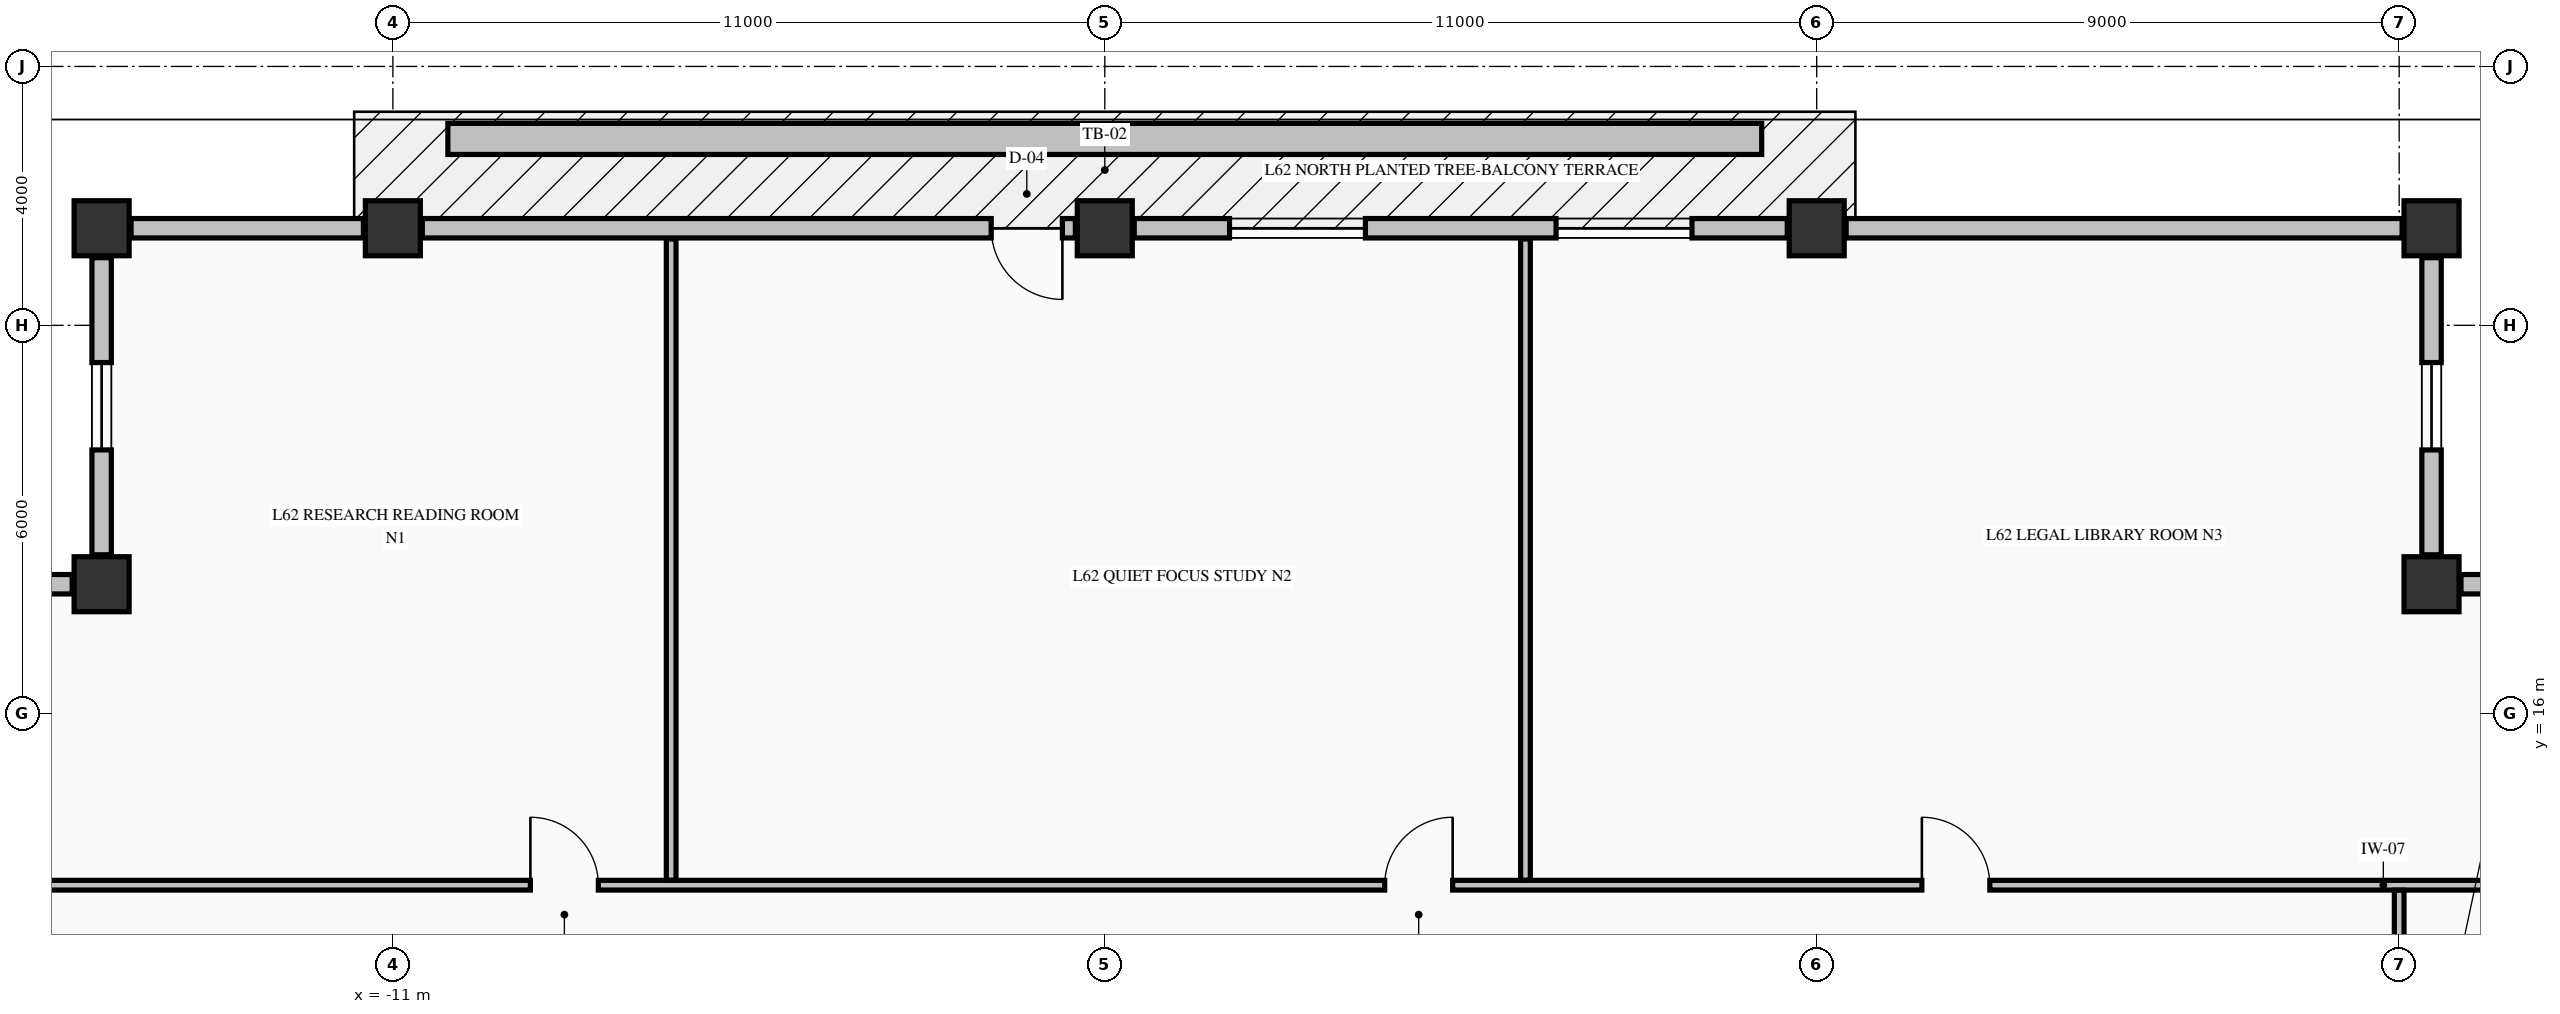
"""IFC4 building model, lengths in metres.
Left out: names, types, materials, properties, quantities, classifications, styles, units other than length and angle.
Written with IfcOpenShell. Run it as: python <this file> out.ifc"""

import sys

from ifc_helpers import new_model, si_unit, direction, frame, frame_2d, origin, origin_2d, place, context, subcontext, project, spatial, rectangle, extrude, element, fill, save


model = new_model("IFC4")
c1 = context("Model", 3, precision=1e-05, world=origin(), true_north=direction((0.0, 1.0)))
c2 = subcontext(c1, "Body", "Model", "MODEL_VIEW")
j1 = project(units=[si_unit("LENGTHUNIT", "METRE"), si_unit("PLANEANGLEUNIT", "RADIAN")], contexts=[c1])
p1 = place(None, origin())
s1 = spatial("IfcSite", under=j1, at=p1, CompositionType="ELEMENT")
p2 = place(p1, origin())
s2 = spatial("IfcBuilding", under=s1, at=p2, CompositionType="ELEMENT")
p3 = place(p2, frame((0.0, 0.0, 236.51)))
s3 = spatial("IfcBuildingStorey", under=s2, at=p3, CompositionType="ELEMENT", Elevation=236.51)
for number, where, z_axis, x_axis in (
    (1, (-15.5, 23.5, -0.25), (0.0, 0.0, 1.0), (1.0, 0.0, 0.0)),
    (2, (-11.0, 23.5, -0.25), (0.0, 0.0, 1.0), (1.0, 0.0, 0.0)),
    (3, (0.0, 23.5, -0.25), (0.0, 0.0, 1.0), (1.0, 0.0, 0.0)),
    (4, (11.0, 23.5, -0.25), (0.0, 0.0, 1.0), (1.0, 0.0, 0.0)),
    (5, (20.5, 23.5, -0.25), (0.0, 0.0, 1.0), (1.0, 0.0, 0.0)),
    (6, (20.5, 18.0, -0.25), (0.0, 0.0, 1.0), (1.0, 0.0, 0.0)),
    (7, (-15.5, 18.0, -0.25), (0.0, 0.0, 1.0), (1.0, 0.0, 0.0)),
):
    element("IfcColumn", number, at=place(p3, frame(where, z_axis=z_axis, x_axis=x_axis)), inside=s3, PredefinedType="COLUMN", context=c2, shape_type="SweptSolid", body=[
        extrude(rectangle(XDim=0.85, YDim=0.85, at=origin_2d()), origin(), (0.0, 0.0, 1.0), 3.23),
    ])
p4 = place(p3, frame((25.545, 18.0, 0.0), z_axis=(0.0, 0.0, 1.0), x_axis=(-1.0, 0.0, 0.0)))
e8 = element("IfcWall", 8, at=p4, inside=s3, PredefinedType="STANDARD", context=c2, shape_type="SweptSolid", body=[
    extrude(rectangle(XDim=4.59, YDim=0.3, at=frame_2d((2.295, 0.0))), origin(), (0.0, 0.0, 1.0), 2.372),
])
p5 = place(p4, frame((1.62, 0.0, 0.68)))
e9 = element("IfcOpeningElement", 9, at=p5, cuts=e8, PredefinedType="OPENING", context=c2, shape_type="SweptSolid", body=[
    extrude(rectangle(XDim=1.35, YDim=1.42, at=frame_2d((0.675, 0.71))), frame((0.0, 0.16, 0.0), z_axis=(0.0, -1.0, 0.0), x_axis=(1.0, 0.0, 0.0)), (0.0, 0.0, 1.0), 0.32),
])
p6 = place(p3, frame((20.5, 18.455, 0.0), z_axis=(0.0, 0.0, 1.0), x_axis=(0.0, 1.0, 0.0)))
e10 = element("IfcWall", 10, at=p6, inside=s3, PredefinedType="STANDARD", context=c2, shape_type="SweptSolid", body=[
    extrude(rectangle(XDim=4.59, YDim=0.3, at=frame_2d((2.295, 0.0))), origin(), (0.0, 0.0, 1.0), 2.372),
])
p7 = place(p6, frame((1.62, 0.0, 0.68)))
e11 = element("IfcOpeningElement", 11, at=p7, cuts=e10, PredefinedType="OPENING", context=c2, shape_type="SweptSolid", body=[
    extrude(rectangle(XDim=1.35, YDim=1.42, at=frame_2d((0.675, 0.71))), frame((0.0, 0.16, 0.0), z_axis=(0.0, -1.0, 0.0), x_axis=(1.0, 0.0, 0.0)), (0.0, 0.0, 1.0), 0.32),
])
p8 = place(p3, frame((-15.5, 23.045, 0.0), z_axis=(0.0, 0.0, 1.0), x_axis=(0.0, -1.0, 0.0)))
e12 = element("IfcWall", 12, at=p8, inside=s3, PredefinedType="STANDARD", context=c2, shape_type="SweptSolid", body=[
    extrude(rectangle(XDim=4.59, YDim=0.3, at=frame_2d((2.295, 0.0))), origin(), (0.0, 0.0, 1.0), 2.372),
])
p9 = place(p8, frame((1.62, 0.0, 0.68)))
e13 = element("IfcOpeningElement", 13, at=p9, cuts=e12, PredefinedType="OPENING", context=c2, shape_type="SweptSolid", body=[
    extrude(rectangle(XDim=1.35, YDim=1.42, at=frame_2d((0.675, 0.71))), frame((0.0, 0.16, 0.0), z_axis=(0.0, -1.0, 0.0), x_axis=(1.0, 0.0, 0.0)), (0.0, 0.0, 1.0), 0.32),
])
p10 = place(p3, frame((-15.955, 18.0, 0.0), z_axis=(0.0, 0.0, 1.0), x_axis=(-1.0, 0.0, 0.0)))
e14 = element("IfcWall", 14, at=p10, inside=s3, PredefinedType="STANDARD", context=c2, shape_type="SweptSolid", body=[
    extrude(rectangle(XDim=4.59, YDim=0.3, at=frame_2d((2.295, 0.0))), origin(), (0.0, 0.0, 1.0), 2.372),
])
p11 = place(p10, frame((1.62, 0.0, 0.68)))
e15 = element("IfcOpeningElement", 15, at=p11, cuts=e14, PredefinedType="OPENING", context=c2, shape_type="SweptSolid", body=[
    extrude(rectangle(XDim=1.35, YDim=1.42, at=frame_2d((0.675, 0.71))), frame((0.0, 0.16, 0.0), z_axis=(0.0, -1.0, 0.0), x_axis=(1.0, 0.0, 0.0)), (0.0, 0.0, 1.0), 0.32),
])
p12 = place(p3, frame((-11.455, 23.5, 0.0), z_axis=(0.0, 0.0, 1.0), x_axis=(-1.0, 0.0, 0.0)))
e16 = element("IfcWall", 16, at=p12, inside=s3, PredefinedType="STANDARD", context=c2, shape_type="SweptSolid", body=[
    extrude(rectangle(XDim=3.59, YDim=0.3, at=frame_2d((1.795, 0.0))), origin(), (0.0, 0.0, 1.0), 2.372),
])
p13 = place(p3, frame((-0.455, 23.5, 0.0), z_axis=(0.0, 0.0, 1.0), x_axis=(-1.0, 0.0, 0.0)))
e17 = element("IfcWall", 17, at=p13, inside=s3, PredefinedType="STANDARD", context=c2, shape_type="SweptSolid", body=[
    extrude(rectangle(XDim=10.09, YDim=0.3, at=frame_2d((5.045, 0.0))), origin(), (0.0, 0.0, 1.0), 2.372),
])
p14 = place(p13, frame((0.2, 0.0, 0.0)))
e18 = element("IfcOpeningElement", 18, at=p14, cuts=e17, PredefinedType="OPENING", context=c2, shape_type="SweptSolid", body=[
    extrude(rectangle(XDim=1.1, YDim=2.15, at=frame_2d((0.55, 1.075))), frame((0.0, 0.16, 0.0), z_axis=(0.0, -1.0, 0.0), x_axis=(1.0, 0.0, 0.0)), (0.0, 0.0, 1.0), 0.32),
])
p15 = place(p3, frame((10.545, 23.5, 0.0), z_axis=(0.0, 0.0, 1.0), x_axis=(-1.0, 0.0, 0.0)))
e19 = element("IfcWall", 19, at=p15, inside=s3, PredefinedType="STANDARD", context=c2, shape_type="SweptSolid", body=[
    extrude(rectangle(XDim=10.09, YDim=0.3, at=frame_2d((5.045, 0.0))), origin(), (0.0, 0.0, 1.0), 2.372),
])
p16 = place(p15, frame((1.472, 0.0, 0.7)))
e20 = element("IfcOpeningElement", 20, at=p16, cuts=e19, PredefinedType="OPENING", context=c2, shape_type="SweptSolid", body=[
    extrude(rectangle(XDim=2.1, YDim=1.5, at=frame_2d((1.05, 0.75))), frame((0.0, 0.16, 0.0), z_axis=(0.0, -1.0, 0.0), x_axis=(1.0, 0.0, 0.0)), (0.0, 0.0, 1.0), 0.32),
])
p17 = place(p15, frame((6.518, 0.0, 0.7)))
e21 = element("IfcOpeningElement", 21, at=p17, cuts=e19, PredefinedType="OPENING", context=c2, shape_type="SweptSolid", body=[
    extrude(rectangle(XDim=2.1, YDim=1.5, at=frame_2d((1.05, 0.75))), frame((0.0, 0.16, 0.0), z_axis=(0.0, -1.0, 0.0), x_axis=(1.0, 0.0, 0.0)), (0.0, 0.0, 1.0), 0.32),
])
p18 = place(p3, frame((20.045, 23.5, 0.0), z_axis=(0.0, 0.0, 1.0), x_axis=(-1.0, 0.0, 0.0)))
e22 = element("IfcWall", 22, at=p18, inside=s3, PredefinedType="STANDARD", context=c2, shape_type="SweptSolid", body=[
    extrude(rectangle(XDim=8.59, YDim=0.3, at=frame_2d((4.295, 0.0))), origin(), (0.0, 0.0, 1.0), 2.372),
])
p19 = place(p3, frame((-20.075, 13.35, 0.0), z_axis=(0.0, 0.0, 1.0), x_axis=(1.0, 0.0, 0.0)))
e23 = element("IfcWall", 23, at=p19, inside=s3, PredefinedType="PARTITIONING", context=c2, shape_type="SweptSolid", body=[
    extrude(rectangle(XDim=45.91, YDim=0.15, at=frame_2d((22.955, 0.0))), origin(), (0.0, 0.0, 1.0), 2.98),
])
p20 = place(p19, frame((11.2, 0.0, 0.0)))
e24 = element("IfcOpeningElement", 24, at=p20, cuts=e23, PredefinedType="OPENING", context=c2, shape_type="SweptSolid", body=[
    extrude(rectangle(XDim=1.05, YDim=2.15, at=frame_2d((0.525, 1.075))), frame((0.0, 0.085, 0.0), z_axis=(0.0, -1.0, 0.0), x_axis=(1.0, 0.0, 0.0)), (0.0, 0.0, 1.0), 0.17),
])
p21 = place(p19, frame((24.4, 0.0, 0.0)))
e25 = element("IfcOpeningElement", 25, at=p21, cuts=e23, PredefinedType="OPENING", context=c2, shape_type="SweptSolid", body=[
    extrude(rectangle(XDim=1.05, YDim=2.15, at=frame_2d((0.525, 1.075))), frame((0.0, 0.085, 0.0), z_axis=(0.0, -1.0, 0.0), x_axis=(1.0, 0.0, 0.0)), (0.0, 0.0, 1.0), 0.17),
])
p22 = place(p19, frame((32.7, 0.0, 0.0)))
e26 = element("IfcOpeningElement", 26, at=p22, cuts=e23, PredefinedType="OPENING", context=c2, shape_type="SweptSolid", body=[
    extrude(rectangle(XDim=1.05, YDim=2.15, at=frame_2d((0.525, 1.075))), frame((0.0, 0.085, 0.0), z_axis=(0.0, -1.0, 0.0), x_axis=(1.0, 0.0, 0.0)), (0.0, 0.0, 1.0), 0.17),
])
for number, where, z_axis, x_axis in (
    (27, (-6.7, 13.428, 0.0), (0.0, 0.0, 1.0), (0.0, 1.0, 0.0)),
    (28, (6.5, 13.428, 0.0), (0.0, 0.0, 1.0), (0.0, 1.0, 0.0)),
):
    element("IfcWall", number, at=place(p3, frame(where, z_axis=z_axis, x_axis=x_axis)), inside=s3, PredefinedType="PARTITIONING", context=c2, shape_type="SweptSolid", body=[
        extrude(rectangle(XDim=9.907, YDim=0.15, at=frame_2d((4.954, 0.0))), origin(), (0.0, 0.0, 1.0), 2.98),
    ])
p23 = place(p3, frame((20.0, 10.856, 0.0), z_axis=(0.0, 0.0, 1.0), x_axis=(0.0, 1.0, 0.0)))
e29 = element("IfcWall", 29, at=p23, inside=s3, PredefinedType="PARTITIONING", context=c2, shape_type="SweptSolid", body=[
    extrude(rectangle(XDim=2.416, YDim=0.15, at=frame_2d((1.208, 0.0))), origin(), (0.0, 0.0, 1.0), 2.98),
])
p24 = place(p23, frame((0.599, 0.0, 0.0)))
e30 = element("IfcOpeningElement", 30, at=p24, cuts=e29, PredefinedType="OPENING", context=c2, shape_type="SweptSolid", body=[
    extrude(rectangle(XDim=0.95, YDim=2.15, at=frame_2d((0.475, 1.075))), frame((0.0, 0.085, 0.0), z_axis=(0.0, -1.0, 0.0), x_axis=(1.0, 0.0, 0.0)), (0.0, 0.0, 1.0), 0.17),
])
p25 = place(p3, frame((-10.15, 24.88, -0.04), z_axis=(0.0, 0.0, 1.0), x_axis=(1.0, 0.0, 0.0)))
e31 = element("IfcWall", 31, at=p25, inside=s3, PredefinedType="PARAPET", context=c2, shape_type="SweptSolid", body=[
    extrude(rectangle(XDim=20.3, YDim=0.48, at=frame_2d((10.15, 0.0))), origin(), (0.0, 0.0, 1.0), 0.52),
])
p26 = place(p7, origin())
e32 = element("IfcWindow", 32, at=p26, inside=s3, PartitioningType="SINGLE_PANEL", PredefinedType="WINDOW", context=c2, shape_type="SweptSolid", body=[
    extrude(rectangle(XDim=1.35, YDim=1.42, at=frame_2d((0.675, 0.71))), frame((0.0, 0.03, 0.0), z_axis=(0.0, -1.0, 0.0), x_axis=(1.0, 0.0, 0.0)), (0.0, 0.0, 1.0), 0.06),
])
fill(e11, e32)
p27 = place(p9, origin())
e33 = element("IfcWindow", 33, at=p27, inside=s3, PartitioningType="SINGLE_PANEL", PredefinedType="WINDOW", context=c2, shape_type="SweptSolid", body=[
    extrude(rectangle(XDim=1.35, YDim=1.42, at=frame_2d((0.675, 0.71))), frame((0.0, 0.03, 0.0), z_axis=(0.0, -1.0, 0.0), x_axis=(1.0, 0.0, 0.0)), (0.0, 0.0, 1.0), 0.06),
])
fill(e13, e33)
p28 = place(p14, origin())
e34 = element("IfcDoor", 34, at=p28, inside=s3, OperationType="SINGLE_SWING_LEFT", PredefinedType="DOOR", context=c2, shape_type="SweptSolid", body=[
    extrude(rectangle(XDim=1.1, YDim=2.15, at=frame_2d((0.55, 1.075))), frame((0.0, 0.025, 0.0), z_axis=(0.0, -1.0, 0.0), x_axis=(1.0, 0.0, 0.0)), (0.0, 0.0, 1.0), 0.05),
])
fill(e18, e34)
p29 = place(p16, origin())
e35 = element("IfcWindow", 35, at=p29, inside=s3, PartitioningType="SINGLE_PANEL", PredefinedType="WINDOW", context=c2, shape_type="SweptSolid", body=[
    extrude(rectangle(XDim=2.1, YDim=1.5, at=frame_2d((1.05, 0.75))), frame((0.0, 0.03, 0.0), z_axis=(0.0, -1.0, 0.0), x_axis=(1.0, 0.0, 0.0)), (0.0, 0.0, 1.0), 0.06),
])
fill(e20, e35)
p30 = place(p17, origin())
e36 = element("IfcWindow", 36, at=p30, inside=s3, PartitioningType="SINGLE_PANEL", PredefinedType="WINDOW", context=c2, shape_type="SweptSolid", body=[
    extrude(rectangle(XDim=2.1, YDim=1.5, at=frame_2d((1.05, 0.75))), frame((0.0, 0.03, 0.0), z_axis=(0.0, -1.0, 0.0), x_axis=(1.0, 0.0, 0.0)), (0.0, 0.0, 1.0), 0.06),
])
fill(e21, e36)
p31 = place(p20, origin())
e37 = element("IfcDoor", 37, at=p31, inside=s3, OperationType="SINGLE_SWING_LEFT", PredefinedType="DOOR", context=c2, shape_type="SweptSolid", body=[
    extrude(rectangle(XDim=1.05, YDim=2.15, at=frame_2d((0.525, 1.075))), frame((0.0, 0.025, 0.0), z_axis=(0.0, -1.0, 0.0), x_axis=(1.0, 0.0, 0.0)), (0.0, 0.0, 1.0), 0.05),
])
fill(e24, e37)
p32 = place(p21, origin())
e38 = element("IfcDoor", 38, at=p32, inside=s3, OperationType="SINGLE_SWING_RIGHT", PredefinedType="DOOR", context=c2, shape_type="SweptSolid", body=[
    extrude(rectangle(XDim=1.05, YDim=2.15, at=frame_2d((0.525, 1.075))), frame((0.0, 0.025, 0.0), z_axis=(0.0, -1.0, 0.0), x_axis=(1.0, 0.0, 0.0)), (0.0, 0.0, 1.0), 0.05),
])
fill(e25, e38)
p33 = place(p22, origin())
e39 = element("IfcDoor", 39, at=p33, inside=s3, OperationType="SINGLE_SWING_LEFT", PredefinedType="DOOR", context=c2, shape_type="SweptSolid", body=[
    extrude(rectangle(XDim=1.05, YDim=2.15, at=frame_2d((0.525, 1.075))), frame((0.0, 0.025, 0.0), z_axis=(0.0, -1.0, 0.0), x_axis=(1.0, 0.0, 0.0)), (0.0, 0.0, 1.0), 0.05),
])
fill(e26, e39)
save(model, sys.argv[1])
